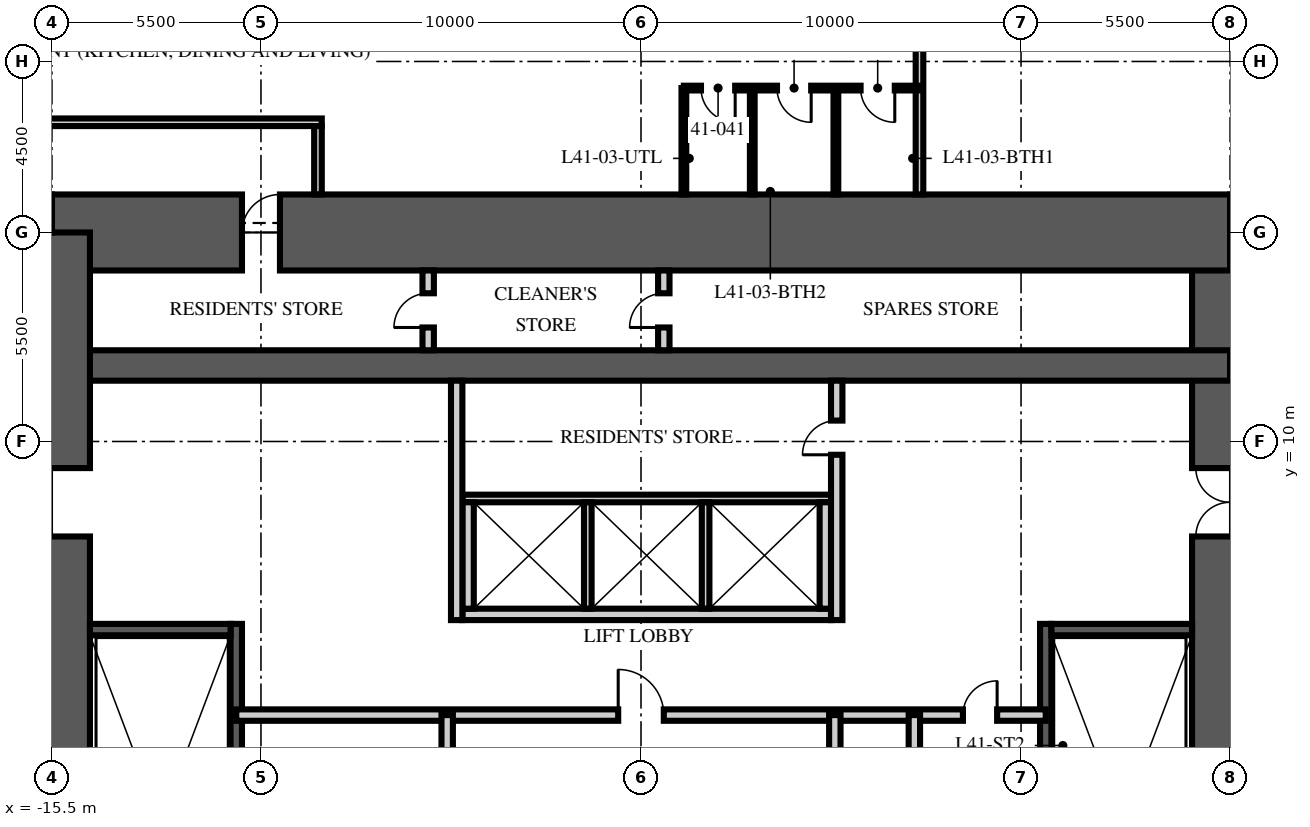
"""IFC4 building model, lengths in metres.
Left out: names, types, materials, properties, quantities, classifications, styles, units other than length and angle.
Written with IfcOpenShell. Run it as: python <this file> out.ifc"""

import sys

from ifc_helpers import new_model, si_unit, direction, frame, frame_2d, origin, place, context, subcontext, project, spatial, rectangle, extrude, element, fill, save


model = new_model("IFC4")
c1 = context("Model", 3, precision=1e-05, world=origin(), true_north=direction((0.0, 1.0)))
c2 = subcontext(c1, "Body", "Model", "MODEL_VIEW")
j1 = project(units=[si_unit("LENGTHUNIT", "METRE"), si_unit("PLANEANGLEUNIT", "RADIAN")], contexts=[c1])
p1 = place(None, origin())
s1 = spatial("IfcSite", under=j1, at=p1, CompositionType="ELEMENT")
p2 = place(p1, origin())
s2 = spatial("IfcBuilding", under=s1, at=p2, CompositionType="ELEMENT")
p3 = place(p2, frame((0.0, 0.0, 163.5)))
s3 = spatial("IfcBuildingStorey", under=s2, at=p3, CompositionType="ELEMENT", Elevation=163.5)
p4 = place(p3, frame((15.5, -15.5, -0.25), z_axis=(0.0, 0.0, 1.0), x_axis=(0.0, 1.0, 0.0)))
e1 = element("IfcWall", 1, at=p4, inside=s3, PredefinedType="SHEAR", context=c2, shape_type="SweptSolid", body=[
    extrude(rectangle(XDim=31.0, YDim=2.0, at=frame_2d((15.5, 0.0))), origin(), (0.0, 0.0, 1.0), 3.75),
])
p5 = place(p4, frame((6.5, 0.0, 0.25)))
e2 = element("IfcOpeningElement", 2, at=p5, cuts=e1, PredefinedType="OPENING", context=c2, shape_type="SweptSolid", body=[
    extrude(rectangle(XDim=1.2, YDim=2.1, at=frame_2d((0.6, 1.05))), frame((0.0, 1.01, 0.0), z_axis=(0.0, -1.0, 0.0), x_axis=(1.0, 0.0, 0.0)), (0.0, 0.0, 1.0), 2.02),
])
p6 = place(p4, frame((23.0, 0.0, 0.25)))
e3 = element("IfcOpeningElement", 3, at=p6, cuts=e1, PredefinedType="OPENING", context=c2, shape_type="SweptSolid", body=[
    extrude(rectangle(XDim=1.8, YDim=2.1, at=frame_2d((0.9, 1.05))), frame((0.0, 1.01, 0.0), z_axis=(0.0, -1.0, 0.0), x_axis=(1.0, 0.0, 0.0)), (0.0, 0.0, 1.0), 2.02),
])
p7 = place(p3, frame((-15.5, 15.5, -0.25), z_axis=(0.0, 0.0, 1.0), x_axis=(1.0, 0.0, 0.0)))
e4 = element("IfcWall", 4, at=p7, inside=s3, PredefinedType="SHEAR", context=c2, shape_type="SweptSolid", body=[
    extrude(rectangle(XDim=31.0, YDim=2.0, at=frame_2d((15.5, 0.0))), origin(), (0.0, 0.0, 1.0), 3.75),
])
p8 = place(p7, frame((5.0, 0.0, 0.25)))
e5 = element("IfcOpeningElement", 5, at=p8, cuts=e4, PredefinedType="OPENING", context=c2, shape_type="SweptSolid", body=[
    extrude(rectangle(XDim=1.0, YDim=2.1, at=frame_2d((0.5, 1.05))), frame((0.0, 1.01, 0.0), z_axis=(0.0, -1.0, 0.0), x_axis=(1.0, 0.0, 0.0)), (0.0, 0.0, 1.0), 2.02),
])
p9 = place(p3, frame((-15.5, 12.0, -0.25), z_axis=(0.0, 0.0, 1.0), x_axis=(1.0, 0.0, 0.0)))
e6 = element("IfcWall", 6, at=p9, inside=s3, PredefinedType="SHEAR", context=c2, shape_type="SweptSolid", body=[
    extrude(rectangle(XDim=31.0, YDim=0.8, at=frame_2d((15.5, 0.0))), origin(), (0.0, 0.0, 1.0), 3.75),
])
p10 = place(p3, frame((-15.5, -15.5, -0.25), z_axis=(0.0, 0.0, 1.0), x_axis=(0.0, 1.0, 0.0)))
e7 = element("IfcWall", 7, at=p10, inside=s3, PredefinedType="SHEAR", context=c2, shape_type="SweptSolid", body=[
    extrude(rectangle(XDim=31.0, YDim=2.0, at=frame_2d((15.5, 0.0))), origin(), (0.0, 0.0, 1.0), 3.75),
])
p11 = place(p10, frame((6.5, 0.0, 0.25)))
e8 = element("IfcOpeningElement", 8, at=p11, cuts=e7, PredefinedType="OPENING", context=c2, shape_type="SweptSolid", body=[
    extrude(rectangle(XDim=1.2, YDim=2.1, at=frame_2d((0.6, 1.05))), frame((0.0, 1.01, 0.0), z_axis=(0.0, -1.0, 0.0), x_axis=(1.0, 0.0, 0.0)), (0.0, 0.0, 1.0), 2.02),
])
p12 = place(p10, frame((23.0, 0.0, 0.25)))
e9 = element("IfcOpeningElement", 9, at=p12, cuts=e7, PredefinedType="OPENING", context=c2, shape_type="SweptSolid", body=[
    extrude(rectangle(XDim=1.8, YDim=2.1, at=frame_2d((0.9, 1.05))), frame((0.0, 1.01, 0.0), z_axis=(0.0, -1.0, 0.0), x_axis=(1.0, 0.0, 0.0)), (0.0, 0.0, 1.0), 2.02),
])
p13 = place(p3, frame((-10.65, -4.9, 0.0), z_axis=(0.0, 0.0, 1.0), x_axis=(0.0, 1.0, 0.0)))
e10 = element("IfcWall", 10, at=p13, inside=s3, PredefinedType="SOLIDWALL", context=c2, shape_type="SweptSolid", body=[
    extrude(rectangle(XDim=10.1, YDim=0.3, at=frame_2d((5.05, 0.0))), origin(), (0.0, 0.0, 1.0), 3.5),
])
p14 = place(p3, frame((-14.5, 5.05, 0.0), z_axis=(0.0, 0.0, 1.0), x_axis=(1.0, 0.0, 0.0)))
e11 = element("IfcWall", 11, at=p14, inside=s3, PredefinedType="SOLIDWALL", context=c2, shape_type="SweptSolid", body=[
    extrude(rectangle(XDim=3.7, YDim=0.3, at=frame_2d((1.85, 0.0))), origin(), (0.0, 0.0, 1.0), 3.5),
])
p15 = place(p3, frame((10.65, -4.9, 0.0), z_axis=(0.0, 0.0, 1.0), x_axis=(0.0, 1.0, 0.0)))
e12 = element("IfcWall", 12, at=p15, inside=s3, PredefinedType="SOLIDWALL", context=c2, shape_type="SweptSolid", body=[
    extrude(rectangle(XDim=10.1, YDim=0.3, at=frame_2d((5.05, 0.0))), origin(), (0.0, 0.0, 1.0), 3.5),
])
p16 = place(p3, frame((14.5, 5.05, 0.0), z_axis=(0.0, 0.0, 1.0), x_axis=(-1.0, 0.0, 0.0)))
e13 = element("IfcWall", 13, at=p16, inside=s3, PredefinedType="SOLIDWALL", context=c2, shape_type="SweptSolid", body=[
    extrude(rectangle(XDim=3.7, YDim=0.3, at=frame_2d((1.85, 0.0))), origin(), (0.0, 0.0, 1.0), 3.5),
])
p17 = place(p3, frame((-4.7, 5.45, 0.0), z_axis=(0.0, 0.0, 1.0), x_axis=(1.0, 0.0, 0.0)))
e14 = element("IfcWall", 14, at=p17, inside=s3, PredefinedType="PARTITIONING", context=c2, shape_type="SweptSolid", body=[
    extrude(rectangle(XDim=9.7, YDim=0.3, at=frame_2d((4.85, 0.0))), origin(), (0.0, 0.0, 1.0), 3.5),
])
p18 = place(p3, frame((-4.7, 8.5, 0.0), z_axis=(0.0, 0.0, 1.0), x_axis=(1.0, 0.0, 0.0)))
e15 = element("IfcWall", 15, at=p18, inside=s3, PredefinedType="PARTITIONING", context=c2, shape_type="SweptSolid", body=[
    extrude(rectangle(XDim=9.7, YDim=0.2, at=frame_2d((4.85, 0.0))), origin(), (0.0, 0.0, 1.0), 3.5),
])
for number, where, z_axis, x_axis in (
    (16, (-4.55, 5.6, 0.0), (0.0, 0.0, 1.0), (0.0, 1.0, 0.0)),
    (17, (4.85, 5.6, 0.0), (0.0, 0.0, 1.0), (0.0, 1.0, 0.0)),
):
    element("IfcWall", number, at=place(p3, frame(where, z_axis=z_axis, x_axis=x_axis)), inside=s3, PredefinedType="PARTITIONING", context=c2, shape_type="SweptSolid", body=[
        extrude(rectangle(XDim=2.8, YDim=0.3, at=frame_2d((1.4, 0.0))), origin(), (0.0, 0.0, 1.0), 3.5),
    ])
for number, where, z_axis, x_axis in (
    (18, (-1.4, 5.6, 0.0), (0.0, 0.0, 1.0), (0.0, 1.0, 0.0)),
    (19, (1.7, 5.6, 0.0), (0.0, 0.0, 1.0), (0.0, 1.0, 0.0)),
):
    element("IfcWall", number, at=place(p3, frame(where, z_axis=z_axis, x_axis=x_axis)), inside=s3, PredefinedType="PARTITIONING", context=c2, shape_type="SweptSolid", body=[
        extrude(rectangle(XDim=2.8, YDim=0.2, at=frame_2d((1.4, 0.0))), origin(), (0.0, 0.0, 1.0), 3.5),
    ])
p19 = place(p3, frame((-10.65, 2.8, 0.0), z_axis=(0.0, 0.0, 1.0), x_axis=(1.0, 0.0, 0.0)))
e20 = element("IfcWall", 20, at=p19, inside=s3, PredefinedType="PARTITIONING", context=c2, shape_type="SweptSolid", body=[
    extrude(rectangle(XDim=21.3, YDim=0.3, at=frame_2d((10.65, 0.0))), origin(), (0.0, 0.0, 1.0), 3.5),
])
p20 = place(p19, frame((10.05, 0.0, 0.0)))
e21 = element("IfcOpeningElement", 21, at=p20, cuts=e20, PredefinedType="OPENING", context=c2, shape_type="SweptSolid", body=[
    extrude(rectangle(XDim=1.2, YDim=2.1, at=frame_2d((0.6, 1.05))), frame((0.0, 0.16, 0.0), z_axis=(0.0, -1.0, 0.0), x_axis=(1.0, 0.0, 0.0)), (0.0, 0.0, 1.0), 0.32),
])
p21 = place(p19, frame((19.121, 0.0, 0.0)))
e22 = element("IfcOpeningElement", 22, at=p21, cuts=e20, PredefinedType="OPENING", context=c2, shape_type="SweptSolid", body=[
    extrude(rectangle(XDim=0.9, YDim=2.1, at=frame_2d((0.45, 1.05))), frame((0.0, 0.16, 0.0), z_axis=(0.0, -1.0, 0.0), x_axis=(1.0, 0.0, 0.0)), (0.0, 0.0, 1.0), 0.32),
])
p22 = place(p3, frame((-5.1, -6.65, 0.0), z_axis=(0.0, 0.0, 1.0), x_axis=(0.0, 1.0, 0.0)))
e23 = element("IfcWall", 23, at=p22, inside=s3, PredefinedType="PARTITIONING", context=c2, shape_type="SweptSolid", body=[
    extrude(rectangle(XDim=9.45, YDim=0.3, at=frame_2d((4.725, 0.0))), origin(), (0.0, 0.0, 1.0), 3.5),
])
p23 = place(p22, frame((2.648, 0.0, 0.0)))
e24 = element("IfcOpeningElement", 24, at=p23, cuts=e23, PredefinedType="OPENING", context=c2, shape_type="SweptSolid", body=[
    extrude(rectangle(XDim=0.9, YDim=2.1, at=frame_2d((0.45, 1.05))), frame((0.0, 0.16, 0.0), z_axis=(0.0, -1.0, 0.0), x_axis=(1.0, 0.0, 0.0)), (0.0, 0.0, 1.0), 0.32),
])
p24 = place(p22, frame((7.373, 0.0, 0.0)))
e25 = element("IfcOpeningElement", 25, at=p24, cuts=e23, PredefinedType="OPENING", context=c2, shape_type="SweptSolid", body=[
    extrude(rectangle(XDim=0.9, YDim=2.1, at=frame_2d((0.45, 1.05))), frame((0.0, 0.16, 0.0), z_axis=(0.0, -1.0, 0.0), x_axis=(1.0, 0.0, 0.0)), (0.0, 0.0, 1.0), 0.32),
])
p25 = place(p3, frame((5.1, -6.65, 0.0), z_axis=(0.0, 0.0, 1.0), x_axis=(0.0, 1.0, 0.0)))
e26 = element("IfcWall", 26, at=p25, inside=s3, PredefinedType="PARTITIONING", context=c2, shape_type="SweptSolid", body=[
    extrude(rectangle(XDim=9.45, YDim=0.3, at=frame_2d((4.725, 0.0))), origin(), (0.0, 0.0, 1.0), 3.5),
])
p26 = place(p25, frame((4.275, 0.0, 0.0)))
e27 = element("IfcOpeningElement", 27, at=p26, cuts=e26, PredefinedType="OPENING", context=c2, shape_type="SweptSolid", body=[
    extrude(rectangle(XDim=0.9, YDim=2.1, at=frame_2d((0.45, 1.05))), frame((0.0, 0.16, 0.0), z_axis=(0.0, -1.0, 0.0), x_axis=(1.0, 0.0, 0.0)), (0.0, 0.0, 1.0), 0.32),
])
p27 = place(p3, frame((7.193, -6.65, 0.0), z_axis=(0.0, 0.0, 1.0), x_axis=(0.0, 1.0, 0.0)))
e28 = element("IfcWall", 28, at=p27, inside=s3, PredefinedType="PARTITIONING", context=c2, shape_type="SweptSolid", body=[
    extrude(rectangle(XDim=9.45, YDim=0.3, at=frame_2d((4.725, 0.0))), origin(), (0.0, 0.0, 1.0), 3.5),
])
p28 = place(p3, frame((-4.85, 5.3, 0.0), z_axis=(0.0, 0.0, 1.0), x_axis=(0.0, 1.0, 0.0)))
e29 = element("IfcWall", 29, at=p28, inside=s3, PredefinedType="PARTITIONING", context=c2, shape_type="SweptSolid", body=[
    extrude(rectangle(XDim=6.3, YDim=0.3, at=frame_2d((3.15, 0.0))), origin(), (0.0, 0.0, 1.0), 3.5),
])
p29 = place(p3, frame((5.15, 5.3, 0.0), z_axis=(0.0, 0.0, 1.0), x_axis=(0.0, 1.0, 0.0)))
e30 = element("IfcWall", 30, at=p29, inside=s3, PredefinedType="PARTITIONING", context=c2, shape_type="SweptSolid", body=[
    extrude(rectangle(XDim=6.3, YDim=0.3, at=frame_2d((3.15, 0.0))), origin(), (0.0, 0.0, 1.0), 3.5),
])
p30 = place(p29, frame((4.35, 0.0, 0.0)))
e31 = element("IfcOpeningElement", 31, at=p30, cuts=e30, PredefinedType="OPENING", context=c2, shape_type="SweptSolid", body=[
    extrude(rectangle(XDim=0.9, YDim=2.1, at=frame_2d((0.45, 1.05))), frame((0.0, 0.16, 0.0), z_axis=(0.0, -1.0, 0.0), x_axis=(1.0, 0.0, 0.0)), (0.0, 0.0, 1.0), 0.32),
])
p31 = place(p3, frame((-5.6, 12.4, 0.0), z_axis=(0.0, 0.0, 1.0), x_axis=(0.0, 1.0, 0.0)))
e32 = element("IfcWall", 32, at=p31, inside=s3, PredefinedType="PARTITIONING", context=c2, shape_type="SweptSolid", body=[
    extrude(rectangle(XDim=2.1, YDim=0.3, at=frame_2d((1.05, 0.0))), origin(), (0.0, 0.0, 1.0), 3.5),
])
p32 = place(p31, frame((0.6, 0.0, 0.0)))
e33 = element("IfcOpeningElement", 33, at=p32, cuts=e32, PredefinedType="OPENING", context=c2, shape_type="SweptSolid", body=[
    extrude(rectangle(XDim=0.9, YDim=2.1, at=frame_2d((0.45, 1.05))), frame((0.0, 0.16, 0.0), z_axis=(0.0, -1.0, 0.0), x_axis=(1.0, 0.0, 0.0)), (0.0, 0.0, 1.0), 0.32),
])
p33 = place(p3, frame((0.6, 12.4, 0.0), z_axis=(0.0, 0.0, 1.0), x_axis=(0.0, 1.0, 0.0)))
e34 = element("IfcWall", 34, at=p33, inside=s3, PredefinedType="PARTITIONING", context=c2, shape_type="SweptSolid", body=[
    extrude(rectangle(XDim=2.1, YDim=0.3, at=frame_2d((1.05, 0.0))), origin(), (0.0, 0.0, 1.0), 3.5),
])
p34 = place(p33, frame((0.6, 0.0, 0.0)))
e35 = element("IfcOpeningElement", 35, at=p34, cuts=e34, PredefinedType="OPENING", context=c2, shape_type="SweptSolid", body=[
    extrude(rectangle(XDim=0.9, YDim=2.1, at=frame_2d((0.45, 1.05))), frame((0.0, 0.16, 0.0), z_axis=(0.0, -1.0, 0.0), x_axis=(1.0, 0.0, 0.0)), (0.0, 0.0, 1.0), 0.32),
])
p35 = place(p3, frame((-18.5, 18.4, 0.0), z_axis=(0.0, 0.0, 1.0), x_axis=(1.0, 0.0, 0.0)))
e36 = element("IfcWall", 36, at=p35, inside=s3, PredefinedType="PARTITIONING", context=c2, shape_type="SweptSolid", body=[
    extrude(rectangle(XDim=10.1, YDim=0.2, at=frame_2d((5.05, 0.0))), origin(), (0.0, 0.0, 1.0), 2.3),
])
p36 = place(p3, frame((-8.5, 18.3, 0.0), z_axis=(0.0, 0.0, 1.0), x_axis=(0.0, -1.0, 0.0)))
e37 = element("IfcWall", 37, at=p36, inside=s3, PredefinedType="PARTITIONING", context=c2, shape_type="SweptSolid", body=[
    extrude(rectangle(XDim=1.8, YDim=0.2, at=frame_2d((0.9, 0.0))), origin(), (0.0, 0.0, 1.0), 3.5),
])
p37 = place(p3, frame((7.328, 16.5, 0.0), z_axis=(0.0, 0.0, 1.0), x_axis=(0.0, 1.0, 0.0)))
e38 = element("IfcWall", 38, at=p37, inside=s3, PredefinedType="PARTITIONING", context=c2, shape_type="SweptSolid", body=[
    extrude(rectangle(XDim=11.9, YDim=0.2, at=frame_2d((5.95, 0.0))), origin(), (0.0, 0.0, 1.0), 2.81),
])
p38 = place(p3, frame((7.328, 19.3, 0.0), z_axis=(0.0, 0.0, 1.0), x_axis=(-1.0, 0.0, 0.0)))
e39 = element("IfcWall", 39, at=p38, inside=s3, PredefinedType="PARTITIONING", context=c2, shape_type="SweptSolid", body=[
    extrude(rectangle(XDim=6.2, YDim=0.125, at=frame_2d((3.1, 0.0))), origin(), (0.0, 0.0, 1.0), 2.81),
])
p39 = place(p38, frame((0.65, 0.0, 0.0)))
e40 = element("IfcOpeningElement", 40, at=p39, cuts=e39, PredefinedType="OPENING", context=c2, shape_type="SweptSolid", body=[
    extrude(rectangle(XDim=0.9, YDim=2.1, at=frame_2d((0.45, 1.05))), frame((0.0, 0.073, 0.0), z_axis=(0.0, -1.0, 0.0), x_axis=(1.0, 0.0, 0.0)), (0.0, 0.0, 1.0), 0.145),
])
p40 = place(p38, frame((2.85, 0.0, 0.0)))
e41 = element("IfcOpeningElement", 41, at=p40, cuts=e39, PredefinedType="OPENING", context=c2, shape_type="SweptSolid", body=[
    extrude(rectangle(XDim=0.9, YDim=2.1, at=frame_2d((0.45, 1.05))), frame((0.0, 0.073, 0.0), z_axis=(0.0, -1.0, 0.0), x_axis=(1.0, 0.0, 0.0)), (0.0, 0.0, 1.0), 0.145),
])
p41 = place(p38, frame((4.85, 0.0, 0.0)))
e42 = element("IfcOpeningElement", 42, at=p41, cuts=e39, PredefinedType="OPENING", context=c2, shape_type="SweptSolid", body=[
    extrude(rectangle(XDim=0.9, YDim=2.1, at=frame_2d((0.45, 1.05))), frame((0.0, 0.073, 0.0), z_axis=(0.0, -1.0, 0.0), x_axis=(1.0, 0.0, 0.0)), (0.0, 0.0, 1.0), 0.145),
])
for number, where, z_axis, x_axis in (
    (43, (5.128, 16.5, 0.0), (0.0, 0.0, 1.0), (0.0, 1.0, 0.0)),
    (44, (2.928, 16.5, 0.0), (0.0, 0.0, 1.0), (0.0, 1.0, 0.0)),
    (45, (1.128, 16.5, 0.0), (0.0, 0.0, 1.0), (0.0, 1.0, 0.0)),
):
    element("IfcWall", number, at=place(p3, frame(where, z_axis=z_axis, x_axis=x_axis)), inside=s3, PredefinedType="PARTITIONING", context=c2, shape_type="SweptSolid", body=[
        extrude(rectangle(XDim=2.8, YDim=0.125, at=frame_2d((1.4, 0.0))), origin(), (0.0, 0.0, 1.0), 3.5),
    ])
p42 = place(p12, origin())
e46 = element("IfcDoor", 46, at=p42, inside=s3, OperationType="DOUBLE_DOOR_SINGLE_SWING", PredefinedType="DOOR", context=c2, shape_type="SweptSolid", body=[
    extrude(rectangle(XDim=1.8, YDim=2.1, at=frame_2d((0.9, 1.05))), frame((0.0, 0.025, 0.0), z_axis=(0.0, -1.0, 0.0), x_axis=(1.0, 0.0, 0.0)), (0.0, 0.0, 1.0), 0.05),
])
fill(e9, e46)
p43 = place(p6, origin())
e47 = element("IfcDoor", 47, at=p43, inside=s3, OperationType="DOUBLE_DOOR_SINGLE_SWING", PredefinedType="DOOR", context=c2, shape_type="SweptSolid", body=[
    extrude(rectangle(XDim=1.8, YDim=2.1, at=frame_2d((0.9, 1.05))), frame((0.0, 0.025, 0.0), z_axis=(0.0, -1.0, 0.0), x_axis=(1.0, 0.0, 0.0)), (0.0, 0.0, 1.0), 0.05),
])
fill(e3, e47)
p44 = place(p20, origin())
e48 = element("IfcDoor", 48, at=p44, inside=s3, OperationType="SINGLE_SWING_LEFT", PredefinedType="DOOR", context=c2, shape_type="SweptSolid", body=[
    extrude(rectangle(XDim=1.2, YDim=2.1, at=frame_2d((0.6, 1.05))), frame((0.0, 0.025, 0.0), z_axis=(0.0, -1.0, 0.0), x_axis=(1.0, 0.0, 0.0)), (0.0, 0.0, 1.0), 0.05),
])
fill(e21, e48)
p45 = place(p21, origin())
e49 = element("IfcDoor", 49, at=p45, inside=s3, OperationType="SINGLE_SWING_RIGHT", PredefinedType="DOOR", context=c2, shape_type="SweptSolid", body=[
    extrude(rectangle(XDim=0.9, YDim=2.1, at=frame_2d((0.45, 1.05))), frame((0.0, 0.025, 0.0), z_axis=(0.0, -1.0, 0.0), x_axis=(1.0, 0.0, 0.0)), (0.0, 0.0, 1.0), 0.05),
])
fill(e22, e49)
p46 = place(p30, origin())
e50 = element("IfcDoor", 50, at=p46, inside=s3, OperationType="SINGLE_SWING_LEFT", PredefinedType="DOOR", context=c2, shape_type="SweptSolid", body=[
    extrude(rectangle(XDim=0.9, YDim=2.1, at=frame_2d((0.45, 1.05))), frame((0.0, 0.025, 0.0), z_axis=(0.0, -1.0, 0.0), x_axis=(1.0, 0.0, 0.0)), (0.0, 0.0, 1.0), 0.05),
])
fill(e31, e50)
p47 = place(p32, origin())
e51 = element("IfcDoor", 51, at=p47, inside=s3, OperationType="SINGLE_SWING_LEFT", PredefinedType="DOOR", context=c2, shape_type="SweptSolid", body=[
    extrude(rectangle(XDim=0.9, YDim=2.1, at=frame_2d((0.45, 1.05))), frame((0.0, 0.025, 0.0), z_axis=(0.0, -1.0, 0.0), x_axis=(1.0, 0.0, 0.0)), (0.0, 0.0, 1.0), 0.05),
])
fill(e33, e51)
p48 = place(p34, origin())
e52 = element("IfcDoor", 52, at=p48, inside=s3, OperationType="SINGLE_SWING_LEFT", PredefinedType="DOOR", context=c2, shape_type="SweptSolid", body=[
    extrude(rectangle(XDim=0.9, YDim=2.1, at=frame_2d((0.45, 1.05))), frame((0.0, 0.025, 0.0), z_axis=(0.0, -1.0, 0.0), x_axis=(1.0, 0.0, 0.0)), (0.0, 0.0, 1.0), 0.05),
])
fill(e35, e52)
p49 = place(p8, origin())
e53 = element("IfcDoor", 53, at=p49, inside=s3, OperationType="SINGLE_SWING_RIGHT", PredefinedType="DOOR", context=c2, shape_type="SweptSolid", body=[
    extrude(rectangle(XDim=1.0, YDim=2.1, at=frame_2d((0.5, 1.05))), frame((0.0, 0.025, 0.0), z_axis=(0.0, -1.0, 0.0), x_axis=(1.0, 0.0, 0.0)), (0.0, 0.0, 1.0), 0.05),
])
fill(e5, e53)
p50 = place(p39, origin())
e54 = element("IfcDoor", 54, at=p50, inside=s3, OperationType="SINGLE_SWING_LEFT", PredefinedType="DOOR", context=c2, shape_type="SweptSolid", body=[
    extrude(rectangle(XDim=0.9, YDim=2.1, at=frame_2d((0.45, 1.05))), frame((0.0, 0.025, 0.0), z_axis=(0.0, -1.0, 0.0), x_axis=(1.0, 0.0, 0.0)), (0.0, 0.0, 1.0), 0.05),
])
fill(e40, e54)
p51 = place(p40, origin())
e55 = element("IfcDoor", 55, at=p51, inside=s3, OperationType="SINGLE_SWING_LEFT", PredefinedType="DOOR", context=c2, shape_type="SweptSolid", body=[
    extrude(rectangle(XDim=0.9, YDim=2.1, at=frame_2d((0.45, 1.05))), frame((0.0, 0.025, 0.0), z_axis=(0.0, -1.0, 0.0), x_axis=(1.0, 0.0, 0.0)), (0.0, 0.0, 1.0), 0.05),
])
fill(e41, e55)
p52 = place(p41, origin())
e56 = element("IfcDoor", 56, at=p52, inside=s3, OperationType="SINGLE_SWING_LEFT", PredefinedType="DOOR", context=c2, shape_type="SweptSolid", body=[
    extrude(rectangle(XDim=0.9, YDim=2.1, at=frame_2d((0.45, 1.05))), frame((0.0, 0.025, 0.0), z_axis=(0.0, -1.0, 0.0), x_axis=(1.0, 0.0, 0.0)), (0.0, 0.0, 1.0), 0.05),
])
fill(e42, e56)
save(model, sys.argv[1])
